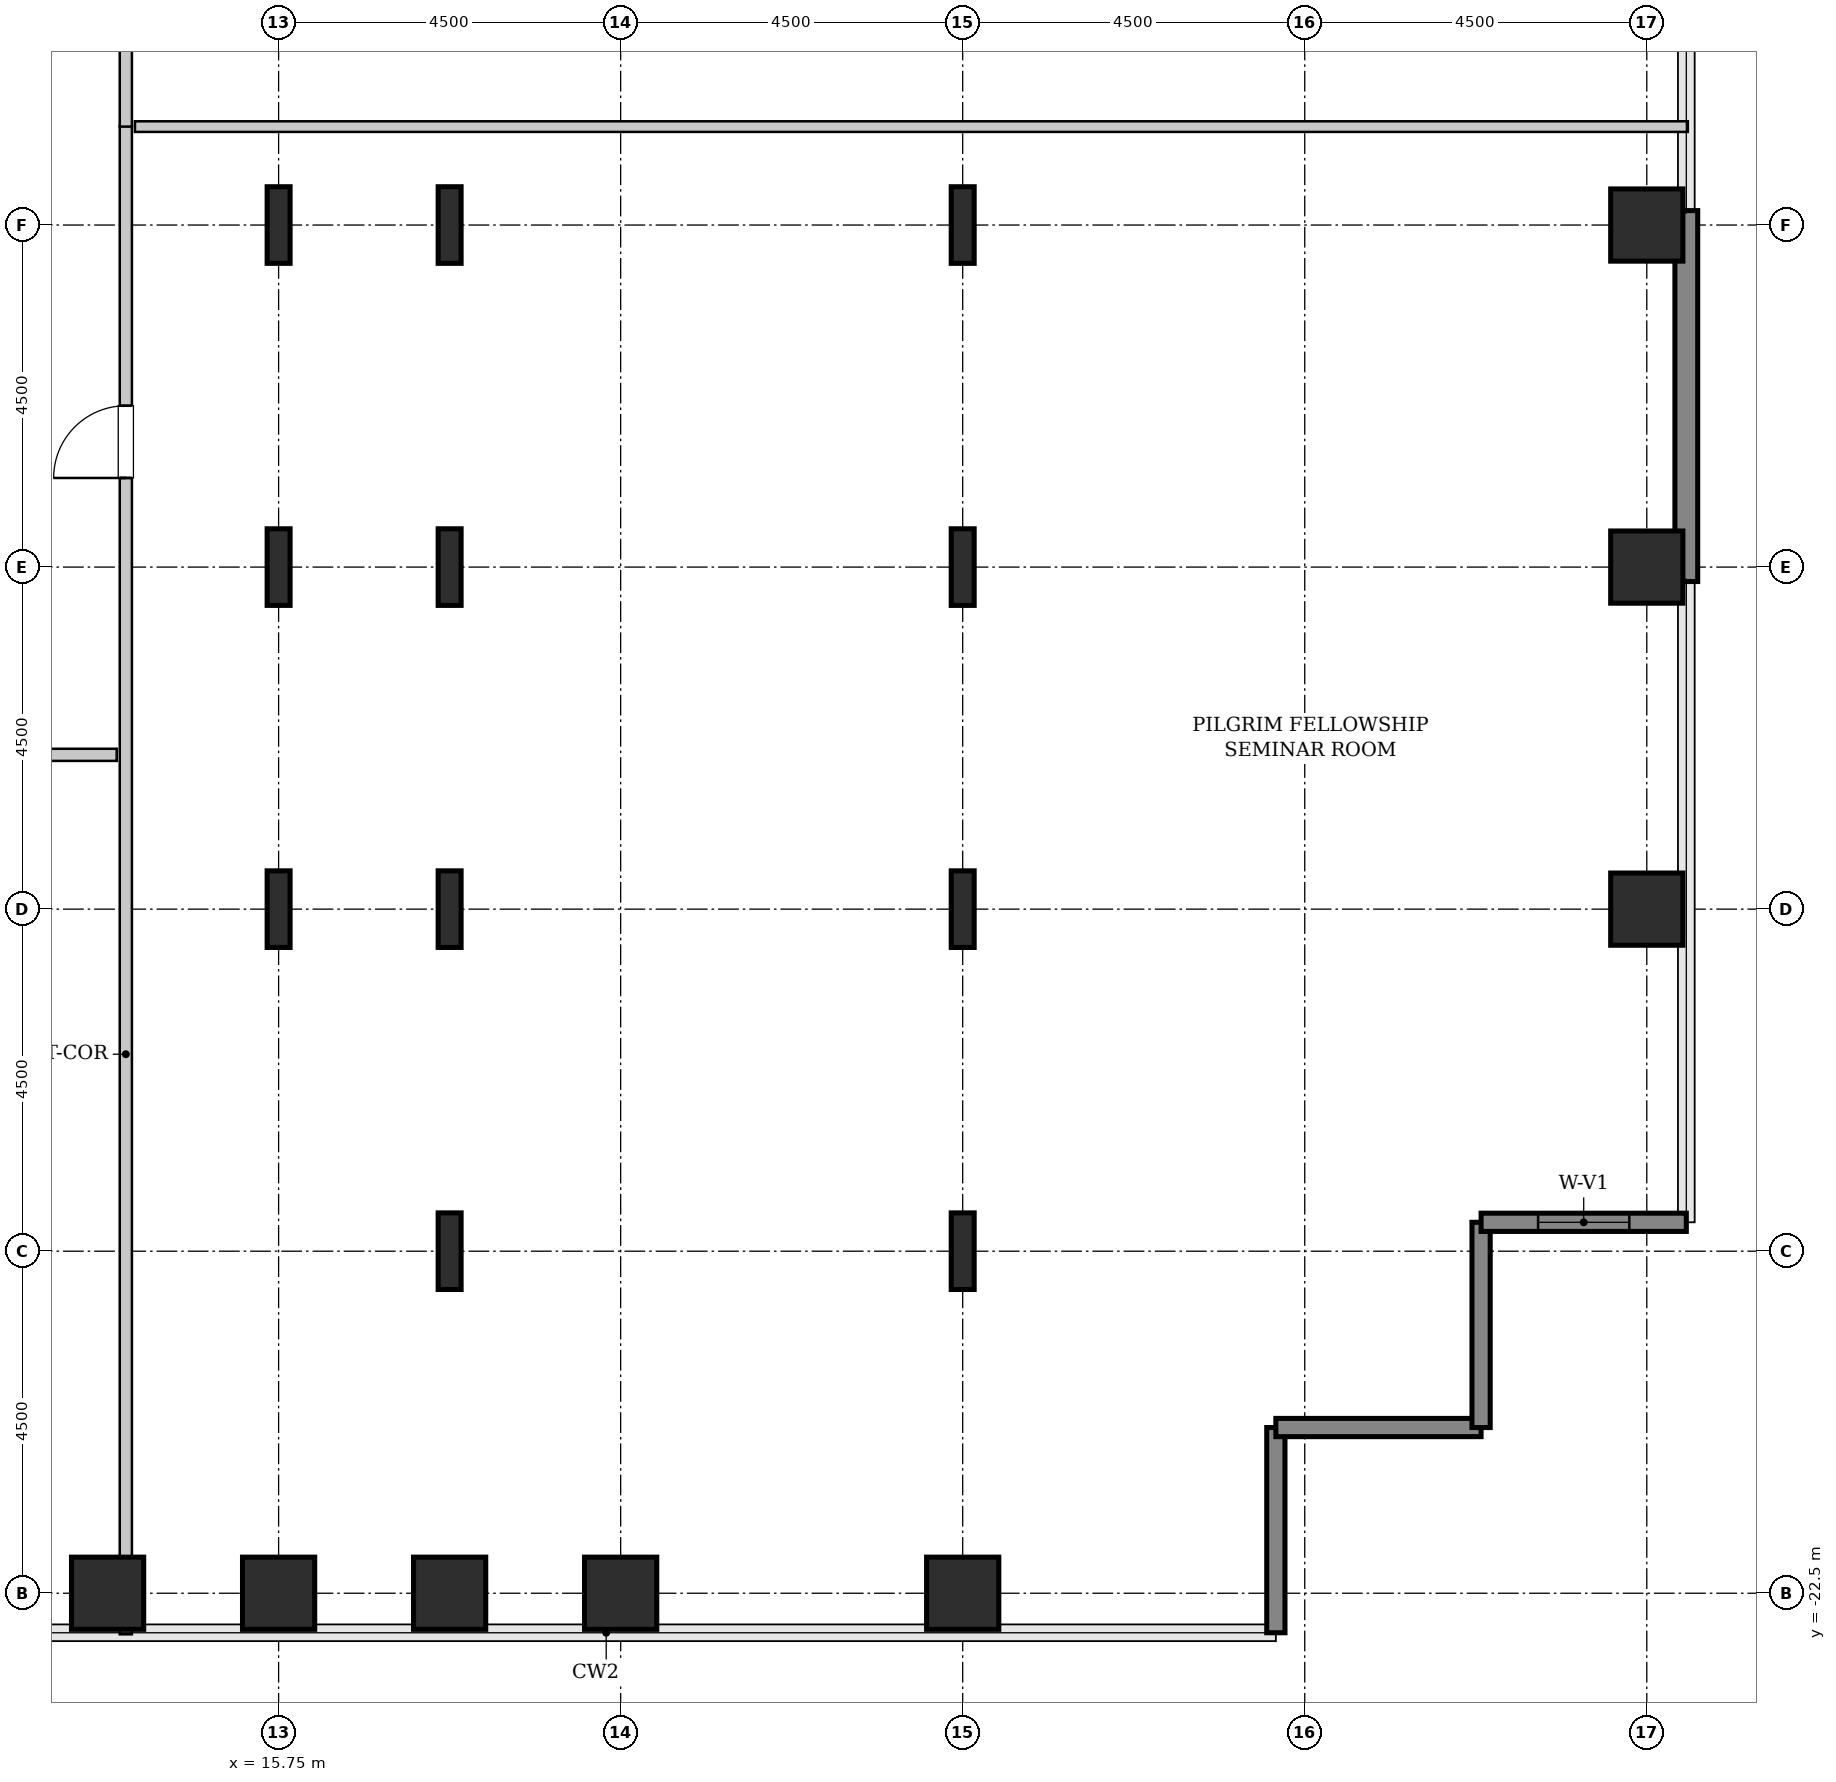
"""IFC4 building model, lengths in metres.
Left out: names, types, materials, properties, quantities, classifications, styles, units other than length and angle.
Written with IfcOpenShell. Run it as: python <this file> out.ifc"""

import sys

from ifc_helpers import new_model, si_unit, direction, frame, frame_2d, origin, origin_2d, place, context, subcontext, project, spatial, rectangle, hollow_rectangle, i_section, extrude, source, transform, mapped, element, fill, save


model = new_model("IFC4")
c1 = context("Model", 3, precision=1e-05, world=origin(), true_north=direction((0.0, 1.0)))
c2 = subcontext(c1, "Body", "Model", "MODEL_VIEW")
j1 = project(units=[si_unit("LENGTHUNIT", "METRE"), si_unit("PLANEANGLEUNIT", "RADIAN")], contexts=[c1])
p1 = place(None, origin())
s1 = spatial("IfcSite", under=j1, at=p1, CompositionType="ELEMENT")
p2 = place(p1, origin())
s2 = spatial("IfcBuilding", under=s1, at=p2, CompositionType="ELEMENT")
p3 = place(p2, frame((0.0, 0.0, 102.2)))
s3 = spatial("IfcBuildingStorey", under=s2, at=p3, CompositionType="ELEMENT", Elevation=102.2)
m1 = source(origin(), c2, "Body", "SweptSolid", [
    extrude(hollow_rectangle(XDim=0.95, YDim=0.95, WallThickness=0.045, InnerFilletRadius=0.045, OuterFilletRadius=0.09, at=origin_2d()), origin(), (0.0, 0.0, 1.0), 3.8),
])
for number, where, z_axis, x_axis in (
    (1, (13.5, -22.5, 0.0), (0.0, 0.0, 1.0), (1.0, 0.0, 0.0)),
    (2, (15.75, -22.5, 0.0), (0.0, 0.0, 1.0), (1.0, 0.0, 0.0)),
):
    element("IfcColumn", number, at=place(p3, frame(where, z_axis=z_axis, x_axis=x_axis)), inside=s3, PredefinedType="COLUMN", context=c2, shape_type="MappedRepresentation", body=[
        mapped(m1, transform((0.0, 0.0, 0.0), x_axis=(1.0, 0.0, 0.0), y_axis=(0.0, 1.0, 0.0), z_axis=(0.0, 0.0, 1.0), scale=1.0)),
    ])
m2 = source(origin(), c2, "Body", "SweptSolid", [
    extrude(i_section(OverallWidth=0.302, OverallDepth=1.008, WebThickness=0.021, FlangeThickness=0.04, FilletRadius=0.03, at=origin_2d()), origin(), (0.0, 0.0, 1.0), 3.8),
])
for number, where, z_axis, x_axis in (
    (3, (15.75, -13.5, 0.0), (0.0, 0.0, 1.0), (1.0, 0.0, 0.0)),
    (4, (15.75, -9.0, 0.0), (0.0, 0.0, 1.0), (1.0, 0.0, 0.0)),
    (5, (15.75, -4.5, 0.0), (0.0, 0.0, 1.0), (1.0, 0.0, 0.0)),
):
    element("IfcColumn", number, at=place(p3, frame(where, z_axis=z_axis, x_axis=x_axis)), inside=s3, PredefinedType="COLUMN", context=c2, shape_type="MappedRepresentation", body=[
        mapped(m2, transform((0.0, 0.0, 0.0), x_axis=(1.0, 0.0, 0.0), y_axis=(0.0, 1.0, 0.0), z_axis=(0.0, 0.0, 1.0), scale=1.0)),
    ])
p4 = place(p3, frame((18.0, -22.5, 0.0), z_axis=(0.0, 0.0, 1.0), x_axis=(1.0, 0.0, 0.0)))
e6 = element("IfcColumn", 6, at=p4, inside=s3, PredefinedType="COLUMN", context=c2, shape_type="MappedRepresentation", body=[
    mapped(m1, transform((0.0, 0.0, 0.0), x_axis=(1.0, 0.0, 0.0), y_axis=(0.0, 1.0, 0.0), z_axis=(0.0, 0.0, 1.0), scale=1.0)),
])
for number, where, z_axis, x_axis in (
    (7, (18.0, -18.0, 0.0), (0.0, 0.0, 1.0), (1.0, 0.0, 0.0)),
    (8, (18.0, -13.5, 0.0), (0.0, 0.0, 1.0), (1.0, 0.0, 0.0)),
    (9, (18.0, -9.0, 0.0), (0.0, 0.0, 1.0), (1.0, 0.0, 0.0)),
    (10, (18.0, -4.5, 0.0), (0.0, 0.0, 1.0), (1.0, 0.0, 0.0)),
):
    element("IfcColumn", number, at=place(p3, frame(where, z_axis=z_axis, x_axis=x_axis)), inside=s3, PredefinedType="COLUMN", context=c2, shape_type="MappedRepresentation", body=[
        mapped(m2, transform((0.0, 0.0, 0.0), x_axis=(1.0, 0.0, 0.0), y_axis=(0.0, 1.0, 0.0), z_axis=(0.0, 0.0, 1.0), scale=1.0)),
    ])
for number, where, z_axis, x_axis in (
    (11, (20.25, -22.5, 0.0), (0.0, 0.0, 1.0), (1.0, 0.0, 0.0)),
    (12, (24.75, -22.5, 0.0), (0.0, 0.0, 1.0), (1.0, 0.0, 0.0)),
):
    element("IfcColumn", number, at=place(p3, frame(where, z_axis=z_axis, x_axis=x_axis)), inside=s3, PredefinedType="COLUMN", context=c2, shape_type="MappedRepresentation", body=[
        mapped(m1, transform((0.0, 0.0, 0.0), x_axis=(1.0, 0.0, 0.0), y_axis=(0.0, 1.0, 0.0), z_axis=(0.0, 0.0, 1.0), scale=1.0)),
    ])
for number, where, z_axis, x_axis in (
    (13, (24.75, -18.0, 0.0), (0.0, 0.0, 1.0), (1.0, 0.0, 0.0)),
    (14, (24.75, -13.5, 0.0), (0.0, 0.0, 1.0), (1.0, 0.0, 0.0)),
    (15, (24.75, -9.0, 0.0), (0.0, 0.0, 1.0), (1.0, 0.0, 0.0)),
    (16, (24.75, -4.5, 0.0), (0.0, 0.0, 1.0), (1.0, 0.0, 0.0)),
):
    element("IfcColumn", number, at=place(p3, frame(where, z_axis=z_axis, x_axis=x_axis)), inside=s3, PredefinedType="COLUMN", context=c2, shape_type="MappedRepresentation", body=[
        mapped(m2, transform((0.0, 0.0, 0.0), x_axis=(1.0, 0.0, 0.0), y_axis=(0.0, 1.0, 0.0), z_axis=(0.0, 0.0, 1.0), scale=1.0)),
    ])
for number, where, z_axis, x_axis in (
    (17, (33.75, -13.5, 0.0), (0.0, 0.0, 1.0), (1.0, 0.0, 0.0)),
    (18, (33.75, -9.0, 0.0), (0.0, 0.0, 1.0), (1.0, 0.0, 0.0)),
    (19, (33.75, -4.5, 0.0), (0.0, 0.0, 1.0), (1.0, 0.0, 0.0)),
):
    element("IfcColumn", number, at=place(p3, frame(where, z_axis=z_axis, x_axis=x_axis)), inside=s3, PredefinedType="COLUMN", context=c2, shape_type="MappedRepresentation", body=[
        mapped(m1, transform((0.0, 0.0, 0.0), x_axis=(1.0, 0.0, 0.0), y_axis=(0.0, 1.0, 0.0), z_axis=(0.0, 0.0, 1.0), scale=1.0)),
    ])
m3 = source(origin(), c2, "Body", "SweptSolid", [
    extrude(rectangle(XDim=4.88, YDim=0.3, at=frame_2d((2.44, 0.0))), origin(), (0.0, 0.0, 1.0), 3.55),
])
p5 = place(p3, frame((34.27, -9.19, 0.0), z_axis=(0.0, 0.0, 1.0), x_axis=(0.0, 1.0, 0.0)))
e20 = element("IfcWall", 20, at=p5, inside=s3, PredefinedType="SHEAR", context=c2, shape_type="MappedRepresentation", body=[
    mapped(m3, transform((0.0, 0.0, 0.0), x_axis=(1.0, 0.0, 0.0), y_axis=(0.0, 1.0, 0.0), z_axis=(0.0, 0.0, 1.0), scale=1.0)),
])
m4 = source(origin(), c2, "Body", "SweptSolid", [
    extrude(rectangle(XDim=2.7, YDim=0.24, at=frame_2d((1.35, 0.0))), origin(), (0.0, 0.0, 1.0), 3.55),
])
for number, where, z_axis, x_axis in (
    (21, (28.87, -23.02, 0.0), (0.0, 0.0, 1.0), (0.0, 1.0, 0.0)),
    (22, (28.87, -20.32, 0.0), (0.0, 0.0, 1.0), (1.0, 0.0, 0.0)),
    (23, (31.57, -20.32, 0.0), (0.0, 0.0, 1.0), (0.0, 1.0, 0.0)),
):
    element("IfcWall", number, at=place(p3, frame(where, z_axis=z_axis, x_axis=x_axis)), inside=s3, PredefinedType="SHEAR", context=c2, shape_type="MappedRepresentation", body=[
        mapped(m4, transform((0.0, 0.0, 0.0), x_axis=(1.0, 0.0, 0.0), y_axis=(0.0, 1.0, 0.0), z_axis=(0.0, 0.0, 1.0), scale=1.0)),
    ])
p6 = place(p3, frame((31.57, -17.62, 0.0), z_axis=(0.0, 0.0, 1.0), x_axis=(1.0, 0.0, 0.0)))
e24 = element("IfcWall", 24, at=p6, inside=s3, PredefinedType="SHEAR", context=c2, shape_type="MappedRepresentation", body=[
    mapped(m4, transform((0.0, 0.0, 0.0), x_axis=(1.0, 0.0, 0.0), y_axis=(0.0, 1.0, 0.0), z_axis=(0.0, 0.0, 1.0), scale=1.0)),
])
p7 = place(p6, frame((0.75, 0.0, 0.85)))
e25 = element("IfcOpeningElement", 25, at=p7, cuts=e24, PredefinedType="OPENING", context=c2, shape_type="SweptSolid", body=[
    extrude(rectangle(XDim=1.2, YDim=1.8, at=frame_2d((0.6, 0.9))), frame((0.0, 0.13, 0.0), z_axis=(0.0, -1.0, 0.0), x_axis=(1.0, 0.0, 0.0)), (0.0, 0.0, 1.0), 0.26),
])
m5 = source(origin(), c2, "Body", "SweptSolid", [
    extrude(rectangle(XDim=19.845, YDim=0.16, at=frame_2d((9.922, 0.0))), origin(), (0.0, 0.0, 1.0), 3.535),
])
p8 = place(p3, frame((13.74, -23.04, 0.0), z_axis=(0.0, 0.0, 1.0), x_axis=(0.0, 1.0, 0.0)))
e26 = element("IfcWall", 26, at=p8, inside=s3, PredefinedType="PARTITIONING", context=c2, shape_type="MappedRepresentation", body=[
    mapped(m5, transform((0.0, 0.0, 0.0), x_axis=(1.0, 0.0, 0.0), y_axis=(0.0, 1.0, 0.0), z_axis=(0.0, 0.0, 1.0), scale=1.0)),
])
p9 = place(p8, frame((15.212, 0.0, 0.0)))
e27 = element("IfcOpeningElement", 27, at=p9, cuts=e26, PredefinedType="OPENING", context=c2, shape_type="SweptSolid", body=[
    extrude(rectangle(XDim=0.95, YDim=2.1, at=frame_2d((0.475, 1.05))), frame((0.0, 0.09, 0.0), z_axis=(0.0, -1.0, 0.0), x_axis=(1.0, 0.0, 0.0)), (0.0, 0.0, 1.0), 0.18),
])
m6 = source(origin(), c2, "Body", "SweptSolid", [
    extrude(rectangle(XDim=20.43, YDim=0.14, at=frame_2d((10.215, 0.0))), origin(), (0.0, 0.0, 1.0), 3.535),
])
p10 = place(p3, frame((13.86, -3.205, 0.0), z_axis=(0.0, 0.0, 1.0), x_axis=(1.0, 0.0, 0.0)))
e28 = element("IfcWall", 28, at=p10, inside=s3, PredefinedType="PARTITIONING", context=c2, shape_type="MappedRepresentation", body=[
    mapped(m6, transform((0.0, 0.0, 0.0), x_axis=(1.0, 0.0, 0.0), y_axis=(0.0, 1.0, 0.0), z_axis=(0.0, 0.0, 1.0), scale=1.0)),
])
m7 = source(origin(), c2, "Body", "SweptSolid", [
    extrude(rectangle(XDim=6.81, YDim=0.16, at=frame_2d((3.405, 0.0))), origin(), (0.0, 0.0, 1.0), 3.535),
])
p11 = place(p3, frame((13.74, -3.205, 0.0), z_axis=(0.0, 0.0, 1.0), x_axis=(0.0, 1.0, 0.0)))
e29 = element("IfcWall", 29, at=p11, inside=s3, PredefinedType="PARTITIONING", context=c2, shape_type="MappedRepresentation", body=[
    mapped(m7, transform((0.0, 0.0, 0.0), x_axis=(1.0, 0.0, 0.0), y_axis=(0.0, 1.0, 0.0), z_axis=(0.0, 0.0, 1.0), scale=1.0)),
])
p12 = place(p11, frame((2.93, 0.0, 0.0)))
e30 = element("IfcOpeningElement", 30, at=p12, cuts=e29, PredefinedType="OPENING", context=c2, shape_type="SweptSolid", body=[
    extrude(rectangle(XDim=0.95, YDim=2.1, at=frame_2d((0.475, 1.05))), frame((0.0, 0.09, 0.0), z_axis=(0.0, -1.0, 0.0), x_axis=(1.0, 0.0, 0.0)), (0.0, 0.0, 1.0), 0.18),
])
m8 = source(origin(), c2, "Body", "SweptSolid", [
    extrude(rectangle(XDim=4.66, YDim=0.16, at=frame_2d((2.33, 0.0))), origin(), (0.0, 0.0, 1.0), 3.535),
])
p13 = place(p3, frame((8.96, -11.47, 0.0), z_axis=(0.0, 0.0, 1.0), x_axis=(1.0, 0.0, 0.0)))
e31 = element("IfcWall", 31, at=p13, inside=s3, PredefinedType="PARTITIONING", context=c2, shape_type="MappedRepresentation", body=[
    mapped(m8, transform((0.0, 0.0, 0.0), x_axis=(1.0, 0.0, 0.0), y_axis=(0.0, 1.0, 0.0), z_axis=(0.0, 0.0, 1.0), scale=1.0)),
])
p14 = place(p13, frame((1.855, 0.0, 0.0)))
e32 = element("IfcOpeningElement", 32, at=p14, cuts=e31, PredefinedType="OPENING", context=c2, shape_type="SweptSolid", body=[
    extrude(rectangle(XDim=0.95, YDim=2.1, at=frame_2d((0.475, 1.05))), frame((0.0, 0.09, 0.0), z_axis=(0.0, -1.0, 0.0), x_axis=(1.0, 0.0, 0.0)), (0.0, 0.0, 1.0), 0.18),
])
m9 = source(origin(), c2, "Body", "SweptSolid", [
    extrude(rectangle(XDim=1.2, YDim=1.8, at=frame_2d((0.6, 0.9))), frame((0.0, 0.03, 0.0), z_axis=(0.0, -1.0, 0.0), x_axis=(1.0, 0.0, 0.0)), (0.0, 0.0, 1.0), 0.06),
])
p15 = place(p7, origin())
e33 = element("IfcWindow", 33, at=p15, inside=s3, PartitioningType="SINGLE_PANEL", PredefinedType="WINDOW", context=c2, shape_type="MappedRepresentation", body=[
    mapped(m9, transform((0.0, 0.0, 0.0), x_axis=(1.0, 0.0, 0.0), y_axis=(0.0, 1.0, 0.0), z_axis=(0.0, 0.0, 1.0), scale=1.0)),
])
fill(e25, e33)
m10 = source(origin(), c2, "Body", "SweptSolid", [
    extrude(rectangle(XDim=0.95, YDim=2.1, at=frame_2d((0.475, 1.05))), frame((0.0, 0.025, 0.0), z_axis=(0.0, -1.0, 0.0), x_axis=(1.0, 0.0, 0.0)), (0.0, 0.0, 1.0), 0.05),
])
p16 = place(p9, origin())
e34 = element("IfcDoor", 34, at=p16, inside=s3, OperationType="SINGLE_SWING_LEFT", PredefinedType="DOOR", context=c2, shape_type="MappedRepresentation", body=[
    mapped(m10, transform((0.0, 0.0, 0.0), x_axis=(1.0, 0.0, 0.0), y_axis=(0.0, 1.0, 0.0), z_axis=(0.0, 0.0, 1.0), scale=1.0)),
])
fill(e27, e34)
save(model, sys.argv[1])
